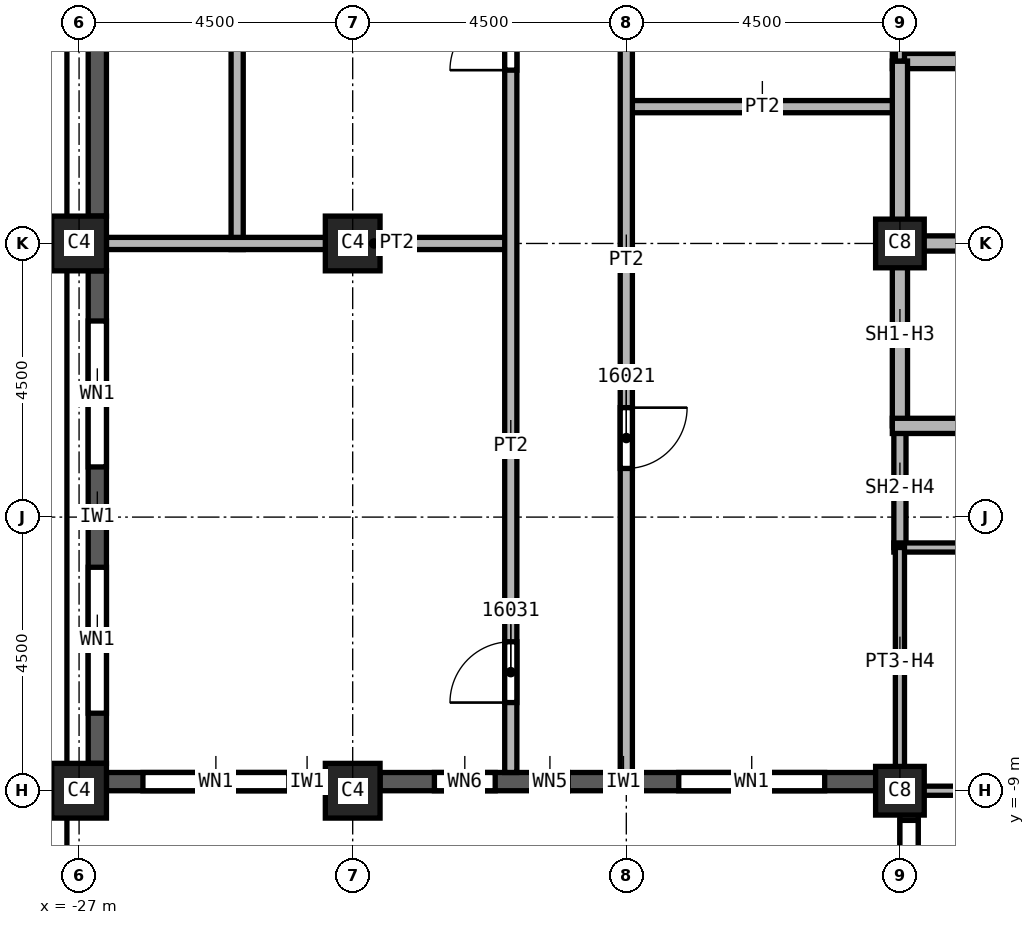
"""IFC4 building model, lengths in metres.
Left out: names, types, materials, properties, quantities, classifications, styles, units other than length and angle.
Written with IfcOpenShell. Run it as: python <this file> out.ifc"""

import sys

from ifc_helpers import new_model, si_unit, direction, frame, frame_2d, origin, origin_2d, place, context, subcontext, project, spatial, rectangle, extrude, element, fill, save


model = new_model("IFC4")
c1 = context("Model", 3, precision=1e-05, world=origin(), true_north=direction((0.0, 1.0)))
c2 = subcontext(c1, "Body", "Model", "MODEL_VIEW")
j1 = project(units=[si_unit("LENGTHUNIT", "METRE"), si_unit("PLANEANGLEUNIT", "RADIAN")], contexts=[c1])
p1 = place(None, origin())
s1 = spatial("IfcSite", under=j1, at=p1, CompositionType="ELEMENT")
p2 = place(p1, origin())
s2 = spatial("IfcBuilding", under=s1, at=p2, CompositionType="ELEMENT")
p3 = place(p2, frame((0.0, 0.0, 242.0)))
s3 = spatial("IfcBuildingStorey", under=s2, at=p3, CompositionType="ELEMENT", Elevation=242.0)
for number, where, z_axis, x_axis in (
    (1, (-22.5, 0.0, 0.0), (0.0, 0.0, 1.0), (1.0, 0.0, 0.0)),
    (2, (-22.5, -9.0, 0.0), (0.0, 0.0, 1.0), (1.0, 0.0, 0.0)),
):
    element("IfcColumn", number, at=place(p3, frame(where, z_axis=z_axis, x_axis=x_axis)), inside=s3, PredefinedType="COLUMN", context=c2, shape_type="SweptSolid", body=[
        extrude(rectangle(XDim=0.9, YDim=0.9, at=origin_2d()), origin(), (0.0, 0.0, 1.0), 3.72),
    ])
for number, where, z_axis, x_axis in (
    (3, (-13.5, 0.0, 0.0), (0.0, 0.0, 1.0), (1.0, 0.0, 0.0)),
    (4, (-13.5, -9.0, 0.0), (0.0, 0.0, 1.0), (1.0, 0.0, 0.0)),
):
    element("IfcColumn", number, at=place(p3, frame(where, z_axis=z_axis, x_axis=x_axis)), inside=s3, PredefinedType="COLUMN", context=c2, shape_type="SweptSolid", body=[
        extrude(rectangle(XDim=0.8, YDim=0.8, at=origin_2d()), origin(), (0.0, 0.0, 1.0), 3.72),
    ])
for number, where, z_axis, x_axis in (
    (5, (-27.0, 0.0, 0.0), (0.0, 0.0, 1.0), (0.0, 1.0, 0.0)),
    (6, (-27.0, -9.0, 0.0), (0.0, 0.0, 1.0), (0.0, 1.0, 0.0)),
):
    element("IfcColumn", number, at=place(p3, frame(where, z_axis=z_axis, x_axis=x_axis)), inside=s3, PredefinedType="COLUMN", context=c2, shape_type="SweptSolid", body=[
        extrude(rectangle(XDim=0.9, YDim=0.9, at=origin_2d()), origin(), (0.0, 0.0, 1.0), 3.72),
    ])
p4 = place(p3, frame((-26.7, 0.45, 0.0), z_axis=(0.0, 0.0, 1.0), x_axis=(0.0, 1.0, 0.0)))
e7 = element("IfcWall", 7, at=p4, inside=s3, PredefinedType="SOLIDWALL", context=c2, shape_type="SweptSolid", body=[
    extrude(rectangle(XDim=8.1, YDim=0.3, at=frame_2d((4.05, 0.0))), origin(), (0.0, 0.0, 1.0), 3.12),
])
p5 = place(p4, frame((3.45, 0.0, 0.0)))
e8 = element("IfcOpeningElement", 8, at=p5, cuts=e7, PredefinedType="OPENING", context=c2, shape_type="SweptSolid", body=[
    extrude(rectangle(XDim=1.2, YDim=2.4, at=frame_2d((0.6, 1.2))), frame((0.0, 0.15, 0.0), z_axis=(0.0, -1.0, 0.0), x_axis=(1.0, 0.0, 0.0)), (0.0, 0.0, 1.0), 0.3),
])
p6 = place(p3, frame((-26.7, -0.45, 0.0), z_axis=(0.0, 0.0, 1.0), x_axis=(0.0, -1.0, 0.0)))
e9 = element("IfcWall", 9, at=p6, inside=s3, PredefinedType="SOLIDWALL", context=c2, shape_type="SweptSolid", body=[
    extrude(rectangle(XDim=8.1, YDim=0.3, at=frame_2d((4.05, 0.0))), origin(), (0.0, 0.0, 1.0), 3.12),
])
p7 = place(p6, frame((0.825, 0.0, 0.8)))
e10 = element("IfcOpeningElement", 10, at=p7, cuts=e9, PredefinedType="OPENING", context=c2, shape_type="SweptSolid", body=[
    extrude(rectangle(XDim=2.4, YDim=1.95, at=frame_2d((1.2, 0.975))), frame((0.0, 0.15, 0.0), z_axis=(0.0, -1.0, 0.0), x_axis=(1.0, 0.0, 0.0)), (0.0, 0.0, 1.0), 0.3),
])
p8 = place(p6, frame((4.875, 0.0, 0.8)))
e11 = element("IfcOpeningElement", 11, at=p8, cuts=e9, PredefinedType="OPENING", context=c2, shape_type="SweptSolid", body=[
    extrude(rectangle(XDim=2.4, YDim=1.95, at=frame_2d((1.2, 0.975))), frame((0.0, 0.15, 0.0), z_axis=(0.0, -1.0, 0.0), x_axis=(1.0, 0.0, 0.0)), (0.0, 0.0, 1.0), 0.3),
])
p9 = place(p3, frame((-13.35, -9.025, 0.0), z_axis=(0.0, 0.0, 1.0), x_axis=(0.0, -1.0, 0.0)))
e12 = element("IfcWall", 12, at=p9, inside=s3, PredefinedType="SOLIDWALL", context=c2, shape_type="SweptSolid", body=[
    extrude(rectangle(XDim=8.525, YDim=0.3, at=frame_2d((4.263, 0.0))), origin(), (0.0, 0.0, 1.0), 3.12),
])
p10 = place(p9, frame((0.462, 0.0, 0.8)))
e13 = element("IfcOpeningElement", 13, at=p10, cuts=e12, PredefinedType="OPENING", context=c2, shape_type="SweptSolid", body=[
    extrude(rectangle(XDim=2.4, YDim=1.95, at=frame_2d((1.2, 0.975))), frame((0.0, 0.15, 0.0), z_axis=(0.0, -1.0, 0.0), x_axis=(1.0, 0.0, 0.0)), (0.0, 0.0, 1.0), 0.3),
])
p11 = place(p9, frame((4.538, 0.0, 0.8)))
e14 = element("IfcOpeningElement", 14, at=p11, cuts=e12, PredefinedType="OPENING", context=c2, shape_type="SweptSolid", body=[
    extrude(rectangle(XDim=2.4, YDim=1.95, at=frame_2d((1.2, 0.975))), frame((0.0, 0.15, 0.0), z_axis=(0.0, -1.0, 0.0), x_axis=(1.0, 0.0, 0.0)), (0.0, 0.0, 1.0), 0.3),
])
p12 = place(p3, frame((-26.55, -8.85, 0.0), z_axis=(0.0, 0.0, 1.0), x_axis=(1.0, 0.0, 0.0)))
e15 = element("IfcWall", 15, at=p12, inside=s3, PredefinedType="SOLIDWALL", context=c2, shape_type="SweptSolid", body=[
    extrude(rectangle(XDim=3.6, YDim=0.3, at=frame_2d((1.8, 0.0))), origin(), (0.0, 0.0, 1.0), 3.12),
])
p13 = place(p12, frame((0.6, 0.0, 0.8)))
e16 = element("IfcOpeningElement", 16, at=p13, cuts=e15, PredefinedType="OPENING", context=c2, shape_type="SweptSolid", body=[
    extrude(rectangle(XDim=2.4, YDim=1.95, at=frame_2d((1.2, 0.975))), frame((0.0, 0.15, 0.0), z_axis=(0.0, -1.0, 0.0), x_axis=(1.0, 0.0, 0.0)), (0.0, 0.0, 1.0), 0.3),
])
p14 = place(p3, frame((-22.05, -8.85, 0.0), z_axis=(0.0, 0.0, 1.0), x_axis=(1.0, 0.0, 0.0)))
e17 = element("IfcWall", 17, at=p14, inside=s3, PredefinedType="SOLIDWALL", context=c2, shape_type="SweptSolid", body=[
    extrude(rectangle(XDim=8.525, YDim=0.3, at=frame_2d((4.263, 0.0))), origin(), (0.0, 0.0, 1.0), 3.12),
])
p15 = place(p14, frame((4.913, 0.0, 0.8)))
e18 = element("IfcOpeningElement", 18, at=p15, cuts=e17, PredefinedType="OPENING", context=c2, shape_type="SweptSolid", body=[
    extrude(rectangle(XDim=2.4, YDim=1.95, at=frame_2d((1.2, 0.975))), frame((0.0, 0.15, 0.0), z_axis=(0.0, -1.0, 0.0), x_axis=(1.0, 0.0, 0.0)), (0.0, 0.0, 1.0), 0.3),
])
p16 = place(p14, frame((0.894, 0.0, 0.8)))
e19 = element("IfcOpeningElement", 19, at=p16, cuts=e17, PredefinedType="OPENING", context=c2, shape_type="SweptSolid", body=[
    extrude(rectangle(XDim=1.0, YDim=1.95, at=frame_2d((0.5, 0.975))), frame((0.0, 0.15, 0.0), z_axis=(0.0, -1.0, 0.0), x_axis=(1.0, 0.0, 0.0)), (0.0, 0.0, 1.0), 0.3),
])
p17 = place(p14, frame((2.494, 0.0, 0.8)))
e20 = element("IfcOpeningElement", 20, at=p17, cuts=e17, PredefinedType="OPENING", context=c2, shape_type="SweptSolid", body=[
    extrude(rectangle(XDim=0.6, YDim=1.95, at=frame_2d((0.3, 0.975))), frame((0.0, 0.15, 0.0), z_axis=(0.0, -1.0, 0.0), x_axis=(1.0, 0.0, 0.0)), (0.0, 0.0, 1.0), 0.3),
])
p18 = place(p3, frame((-24.4, -0.1, 0.0), z_axis=(0.0, 0.0, 1.0), x_axis=(0.0, 1.0, 0.0)))
e21 = element("IfcWall", 21, at=p18, inside=s3, PredefinedType="PARTITIONING", context=c2, shape_type="SweptSolid", body=[
    extrude(rectangle(XDim=17.65, YDim=0.2, at=frame_2d((8.825, 0.0))), origin(), (0.0, 0.0, 1.0), 3.72),
])
p19 = place(p18, frame((9.95, 0.0, 0.0)))
e22 = element("IfcOpeningElement", 22, at=p19, cuts=e21, PredefinedType="OPENING", context=c2, shape_type="SweptSolid", body=[
    extrude(rectangle(XDim=1.0, YDim=2.1, at=frame_2d((0.5, 1.05))), frame((0.0, 0.1, 0.0), z_axis=(0.0, -1.0, 0.0), x_axis=(1.0, 0.0, 0.0)), (0.0, 0.0, 1.0), 0.2),
])
p20 = place(p3, frame((-19.9, 0.0, 0.0), z_axis=(0.0, 0.0, 1.0), x_axis=(-1.0, 0.0, 0.0)))
e23 = element("IfcWall", 23, at=p20, inside=s3, PredefinedType="PARTITIONING", context=c2, shape_type="SweptSolid", body=[
    extrude(rectangle(XDim=6.65, YDim=0.2, at=frame_2d((3.325, 0.0))), origin(), (0.0, 0.0, 1.0), 3.72),
])
p21 = place(p3, frame((-19.9, -8.7, 0.0), z_axis=(0.0, 0.0, 1.0), x_axis=(0.0, 1.0, 0.0)))
e24 = element("IfcWall", 24, at=p21, inside=s3, PredefinedType="PARTITIONING", context=c2, shape_type="SweptSolid", body=[
    extrude(rectangle(XDim=22.3, YDim=0.2, at=frame_2d((11.15, 0.0))), origin(), (0.0, 0.0, 1.0), 3.72),
])
p22 = place(p21, frame((11.55, 0.0, 0.0)))
e25 = element("IfcOpeningElement", 25, at=p22, cuts=e24, PredefinedType="OPENING", context=c2, shape_type="SweptSolid", body=[
    extrude(rectangle(XDim=1.0, YDim=2.1, at=frame_2d((0.5, 1.05))), frame((0.0, 0.1, 0.0), z_axis=(0.0, -1.0, 0.0), x_axis=(1.0, 0.0, 0.0)), (0.0, 0.0, 1.0), 0.2),
])
p23 = place(p21, frame((17.4, 0.0, 0.0)))
e26 = element("IfcOpeningElement", 26, at=p23, cuts=e24, PredefinedType="OPENING", context=c2, shape_type="SweptSolid", body=[
    extrude(rectangle(XDim=1.0, YDim=2.1, at=frame_2d((0.5, 1.05))), frame((0.0, 0.1, 0.0), z_axis=(0.0, -1.0, 0.0), x_axis=(1.0, 0.0, 0.0)), (0.0, 0.0, 1.0), 0.2),
])
p24 = place(p21, frame((1.15, 0.0, 0.0)))
e27 = element("IfcOpeningElement", 27, at=p24, cuts=e24, PredefinedType="OPENING", context=c2, shape_type="SweptSolid", body=[
    extrude(rectangle(XDim=1.0, YDim=2.1, at=frame_2d((0.5, 1.05))), frame((0.0, 0.1, 0.0), z_axis=(0.0, -1.0, 0.0), x_axis=(1.0, 0.0, 0.0)), (0.0, 0.0, 1.0), 0.2),
])
p25 = place(p3, frame((-18.0, 2.25, 0.0), z_axis=(0.0, 0.0, 1.0), x_axis=(1.0, 0.0, 0.0)))
e28 = element("IfcWall", 28, at=p25, inside=s3, PredefinedType="PARTITIONING", context=c2, shape_type="SweptSolid", body=[
    extrude(rectangle(XDim=4.5, YDim=0.2, at=frame_2d((2.25, 0.0))), origin(), (0.0, 0.0, 1.0), 3.72),
])
p26 = place(p3, frame((-18.0, 9.1, 0.0), z_axis=(0.0, 0.0, 1.0), x_axis=(0.0, -1.0, 0.0)))
e29 = element("IfcWall", 29, at=p26, inside=s3, PredefinedType="PARTITIONING", context=c2, shape_type="SweptSolid", body=[
    extrude(rectangle(XDim=17.8, YDim=0.2, at=frame_2d((8.9, 0.0))), origin(), (0.0, 0.0, 1.0), 3.72),
])
p27 = place(p26, frame((11.8, 0.0, 0.0)))
e30 = element("IfcOpeningElement", 30, at=p27, cuts=e29, PredefinedType="OPENING", context=c2, shape_type="SweptSolid", body=[
    extrude(rectangle(XDim=1.0, YDim=2.1, at=frame_2d((0.5, 1.05))), frame((0.0, 0.1, 0.0), z_axis=(0.0, -1.0, 0.0), x_axis=(1.0, 0.0, 0.0)), (0.0, 0.0, 1.0), 0.2),
])
p28 = place(p26, frame((2.05, 0.0, 0.0)))
e31 = element("IfcOpeningElement", 31, at=p28, cuts=e29, PredefinedType="OPENING", context=c2, shape_type="SweptSolid", body=[
    extrude(rectangle(XDim=1.0, YDim=2.1, at=frame_2d((0.5, 1.05))), frame((0.0, 0.1, 0.0), z_axis=(0.0, -1.0, 0.0), x_axis=(1.0, 0.0, 0.0)), (0.0, 0.0, 1.0), 0.2),
])
p29 = place(p3, frame((-13.5, -5.0, 0.0), z_axis=(0.0, 0.0, 1.0), x_axis=(0.0, 1.0, 0.0)))
e32 = element("IfcWall", 32, at=p29, inside=s3, PredefinedType="SOLIDWALL", context=c2, shape_type="SweptSolid", body=[
    extrude(rectangle(XDim=2.0, YDim=0.2, at=frame_2d((1.0, 0.0))), origin(), (0.0, 0.0, 1.0), 3.042),
])
p30 = place(p3, frame((-13.625, 0.0, 0.0), z_axis=(0.0, 0.0, 1.0), x_axis=(1.0, 0.0, 0.0)))
e33 = element("IfcWall", 33, at=p30, inside=s3, PredefinedType="SOLIDWALL", context=c2, shape_type="SweptSolid", body=[
    extrude(rectangle(XDim=3.125, YDim=0.25, at=frame_2d((1.562, 0.0))), origin(), (0.0, 0.0, 1.0), 3.72),
])
p31 = place(p3, frame((-13.625, 3.0, 0.0), z_axis=(0.0, 0.0, 1.0), x_axis=(1.0, 0.0, 0.0)))
e34 = element("IfcWall", 34, at=p31, inside=s3, PredefinedType="SOLIDWALL", context=c2, shape_type="SweptSolid", body=[
    extrude(rectangle(XDim=9.25, YDim=0.25, at=frame_2d((4.625, 0.0))), origin(), (0.0, 0.0, 1.0), 3.72),
])
p32 = place(p31, frame((3.25, 0.0, 0.0)))
e35 = element("IfcOpeningElement", 35, at=p32, cuts=e34, PredefinedType="OPENING", context=c2, shape_type="SweptSolid", body=[
    extrude(rectangle(XDim=1.1, YDim=2.1, at=frame_2d((0.55, 1.05))), frame((0.0, 0.125, 0.0), z_axis=(0.0, -1.0, 0.0), x_axis=(1.0, 0.0, 0.0)), (0.0, 0.0, 1.0), 0.25),
])
p33 = place(p3, frame((-13.5, -3.0, 0.0), z_axis=(0.0, 0.0, 1.0), x_axis=(0.0, 1.0, 0.0)))
e36 = element("IfcWall", 36, at=p33, inside=s3, PredefinedType="SOLIDWALL", context=c2, shape_type="SweptSolid", body=[
    extrude(rectangle(XDim=6.0, YDim=0.25, at=frame_2d((3.0, 0.0))), origin(), (0.0, 0.0, 1.0), 3.042),
])
p34 = place(p3, frame((-13.625, -3.0, 0.0), z_axis=(0.0, 0.0, 1.0), x_axis=(1.0, 0.0, 0.0)))
e37 = element("IfcWall", 37, at=p34, inside=s3, PredefinedType="SOLIDWALL", context=c2, shape_type="SweptSolid", body=[
    extrude(rectangle(XDim=6.125, YDim=0.25, at=frame_2d((3.062, 0.0))), origin(), (0.0, 0.0, 1.0), 3.72),
])
p35 = place(p34, frame((3.25, 0.0, 0.0)))
e38 = element("IfcOpeningElement", 38, at=p35, cuts=e37, PredefinedType="OPENING", context=c2, shape_type="SweptSolid", body=[
    extrude(rectangle(XDim=1.1, YDim=2.1, at=frame_2d((0.55, 1.05))), frame((0.0, 0.125, 0.0), z_axis=(0.0, -1.0, 0.0), x_axis=(1.0, 0.0, 0.0)), (0.0, 0.0, 1.0), 0.25),
])
p36 = place(p3, frame((-13.6, -5.0, 0.0), z_axis=(0.0, 0.0, 1.0), x_axis=(1.0, 0.0, 0.0)))
e39 = element("IfcWall", 39, at=p36, inside=s3, PredefinedType="PARTITIONING", context=c2, shape_type="SweptSolid", body=[
    extrude(rectangle(XDim=3.1, YDim=0.15, at=frame_2d((1.55, 0.0))), origin(), (0.0, 0.0, 1.0), 3.72),
])
p37 = place(p3, frame((-13.5, -9.0, 0.0), z_axis=(0.0, 0.0, 1.0), x_axis=(0.0, 1.0, 0.0)))
e40 = element("IfcWall", 40, at=p37, inside=s3, PredefinedType="PARTITIONING", context=c2, shape_type="SweptSolid", body=[
    extrude(rectangle(XDim=4.0, YDim=0.15, at=frame_2d((2.0, 0.0))), origin(), (0.0, 0.0, 1.0), 3.042),
])
p38 = place(p3, frame((-13.5, 3.0, 0.0), z_axis=(0.0, 0.0, 1.0), x_axis=(0.0, 1.0, 0.0)))
e41 = element("IfcWall", 41, at=p38, inside=s3, PredefinedType="PARTITIONING", context=c2, shape_type="SweptSolid", body=[
    extrude(rectangle(XDim=2.0, YDim=0.15, at=frame_2d((1.0, 0.0))), origin(), (0.0, 0.0, 1.0), 3.042),
])
p39 = place(p3, frame((-10.5, -9.0, 0.0), z_axis=(0.0, 0.0, 1.0), x_axis=(-1.0, 0.0, 0.0)))
e42 = element("IfcWall", 42, at=p39, inside=s3, PredefinedType="PARTITIONING", context=c2, shape_type="SweptSolid", body=[
    extrude(rectangle(XDim=3.025, YDim=0.15, at=frame_2d((1.512, 0.0))), origin(), (0.0, 0.0, 1.0), 3.042),
])
p40 = place(p7, origin())
e43 = element("IfcWindow", 43, at=p40, inside=s3, PartitioningType="SINGLE_PANEL", PredefinedType="WINDOW", context=c2, shape_type="SweptSolid", body=[
    extrude(rectangle(XDim=2.4, YDim=1.95, at=frame_2d((1.2, 0.975))), frame((0.0, 0.03, 0.0), z_axis=(0.0, -1.0, 0.0), x_axis=(1.0, 0.0, 0.0)), (0.0, 0.0, 1.0), 0.06),
])
fill(e10, e43)
p41 = place(p8, origin())
e44 = element("IfcWindow", 44, at=p41, inside=s3, PartitioningType="SINGLE_PANEL", PredefinedType="WINDOW", context=c2, shape_type="SweptSolid", body=[
    extrude(rectangle(XDim=2.4, YDim=1.95, at=frame_2d((1.2, 0.975))), frame((0.0, 0.03, 0.0), z_axis=(0.0, -1.0, 0.0), x_axis=(1.0, 0.0, 0.0)), (0.0, 0.0, 1.0), 0.06),
])
fill(e11, e44)
p42 = place(p10, origin())
e45 = element("IfcWindow", 45, at=p42, inside=s3, PartitioningType="SINGLE_PANEL", PredefinedType="WINDOW", context=c2, shape_type="SweptSolid", body=[
    extrude(rectangle(XDim=2.4, YDim=1.95, at=frame_2d((1.2, 0.975))), frame((0.0, 0.03, 0.0), z_axis=(0.0, -1.0, 0.0), x_axis=(1.0, 0.0, 0.0)), (0.0, 0.0, 1.0), 0.06),
])
fill(e13, e45)
p43 = place(p13, origin())
e46 = element("IfcWindow", 46, at=p43, inside=s3, PartitioningType="SINGLE_PANEL", PredefinedType="WINDOW", context=c2, shape_type="SweptSolid", body=[
    extrude(rectangle(XDim=2.4, YDim=1.95, at=frame_2d((1.2, 0.975))), frame((0.0, 0.03, 0.0), z_axis=(0.0, -1.0, 0.0), x_axis=(1.0, 0.0, 0.0)), (0.0, 0.0, 1.0), 0.06),
])
fill(e16, e46)
p44 = place(p15, origin())
e47 = element("IfcWindow", 47, at=p44, inside=s3, PartitioningType="SINGLE_PANEL", PredefinedType="WINDOW", context=c2, shape_type="SweptSolid", body=[
    extrude(rectangle(XDim=2.4, YDim=1.95, at=frame_2d((1.2, 0.975))), frame((0.0, 0.03, 0.0), z_axis=(0.0, -1.0, 0.0), x_axis=(1.0, 0.0, 0.0)), (0.0, 0.0, 1.0), 0.06),
])
fill(e18, e47)
p45 = place(p27, origin())
e48 = element("IfcDoor", 48, at=p45, inside=s3, OperationType="SINGLE_SWING_RIGHT", PredefinedType="DOOR", context=c2, shape_type="SweptSolid", body=[
    extrude(rectangle(XDim=1.0, YDim=2.1, at=frame_2d((0.5, 1.05))), frame((0.0, 0.025, 0.0), z_axis=(0.0, -1.0, 0.0), x_axis=(1.0, 0.0, 0.0)), (0.0, 0.0, 1.0), 0.05),
])
fill(e30, e48)
p46 = place(p22, origin())
e49 = element("IfcDoor", 49, at=p46, inside=s3, OperationType="SINGLE_SWING_LEFT", PredefinedType="DOOR", context=c2, shape_type="SweptSolid", body=[
    extrude(rectangle(XDim=1.0, YDim=2.1, at=frame_2d((0.5, 1.05))), frame((0.0, 0.025, 0.0), z_axis=(0.0, -1.0, 0.0), x_axis=(1.0, 0.0, 0.0)), (0.0, 0.0, 1.0), 0.05),
])
fill(e25, e49)
p47 = place(p24, origin())
e50 = element("IfcDoor", 50, at=p47, inside=s3, OperationType="SINGLE_SWING_RIGHT", PredefinedType="DOOR", context=c2, shape_type="SweptSolid", body=[
    extrude(rectangle(XDim=1.0, YDim=2.1, at=frame_2d((0.5, 1.05))), frame((0.0, 0.025, 0.0), z_axis=(0.0, -1.0, 0.0), x_axis=(1.0, 0.0, 0.0)), (0.0, 0.0, 1.0), 0.05),
])
fill(e27, e50)
p48 = place(p16, origin())
e51 = element("IfcWindow", 51, at=p48, inside=s3, PartitioningType="SINGLE_PANEL", PredefinedType="WINDOW", context=c2, shape_type="SweptSolid", body=[
    extrude(rectangle(XDim=1.0, YDim=1.95, at=frame_2d((0.5, 0.975))), frame((0.0, 0.03, 0.0), z_axis=(0.0, -1.0, 0.0), x_axis=(1.0, 0.0, 0.0)), (0.0, 0.0, 1.0), 0.06),
])
fill(e19, e51)
p49 = place(p17, origin())
e52 = element("IfcWindow", 52, at=p49, inside=s3, PartitioningType="SINGLE_PANEL", PredefinedType="WINDOW", context=c2, shape_type="SweptSolid", body=[
    extrude(rectangle(XDim=0.6, YDim=1.95, at=frame_2d((0.3, 0.975))), frame((0.0, 0.03, 0.0), z_axis=(0.0, -1.0, 0.0), x_axis=(1.0, 0.0, 0.0)), (0.0, 0.0, 1.0), 0.06),
])
fill(e20, e52)
save(model, sys.argv[1])
